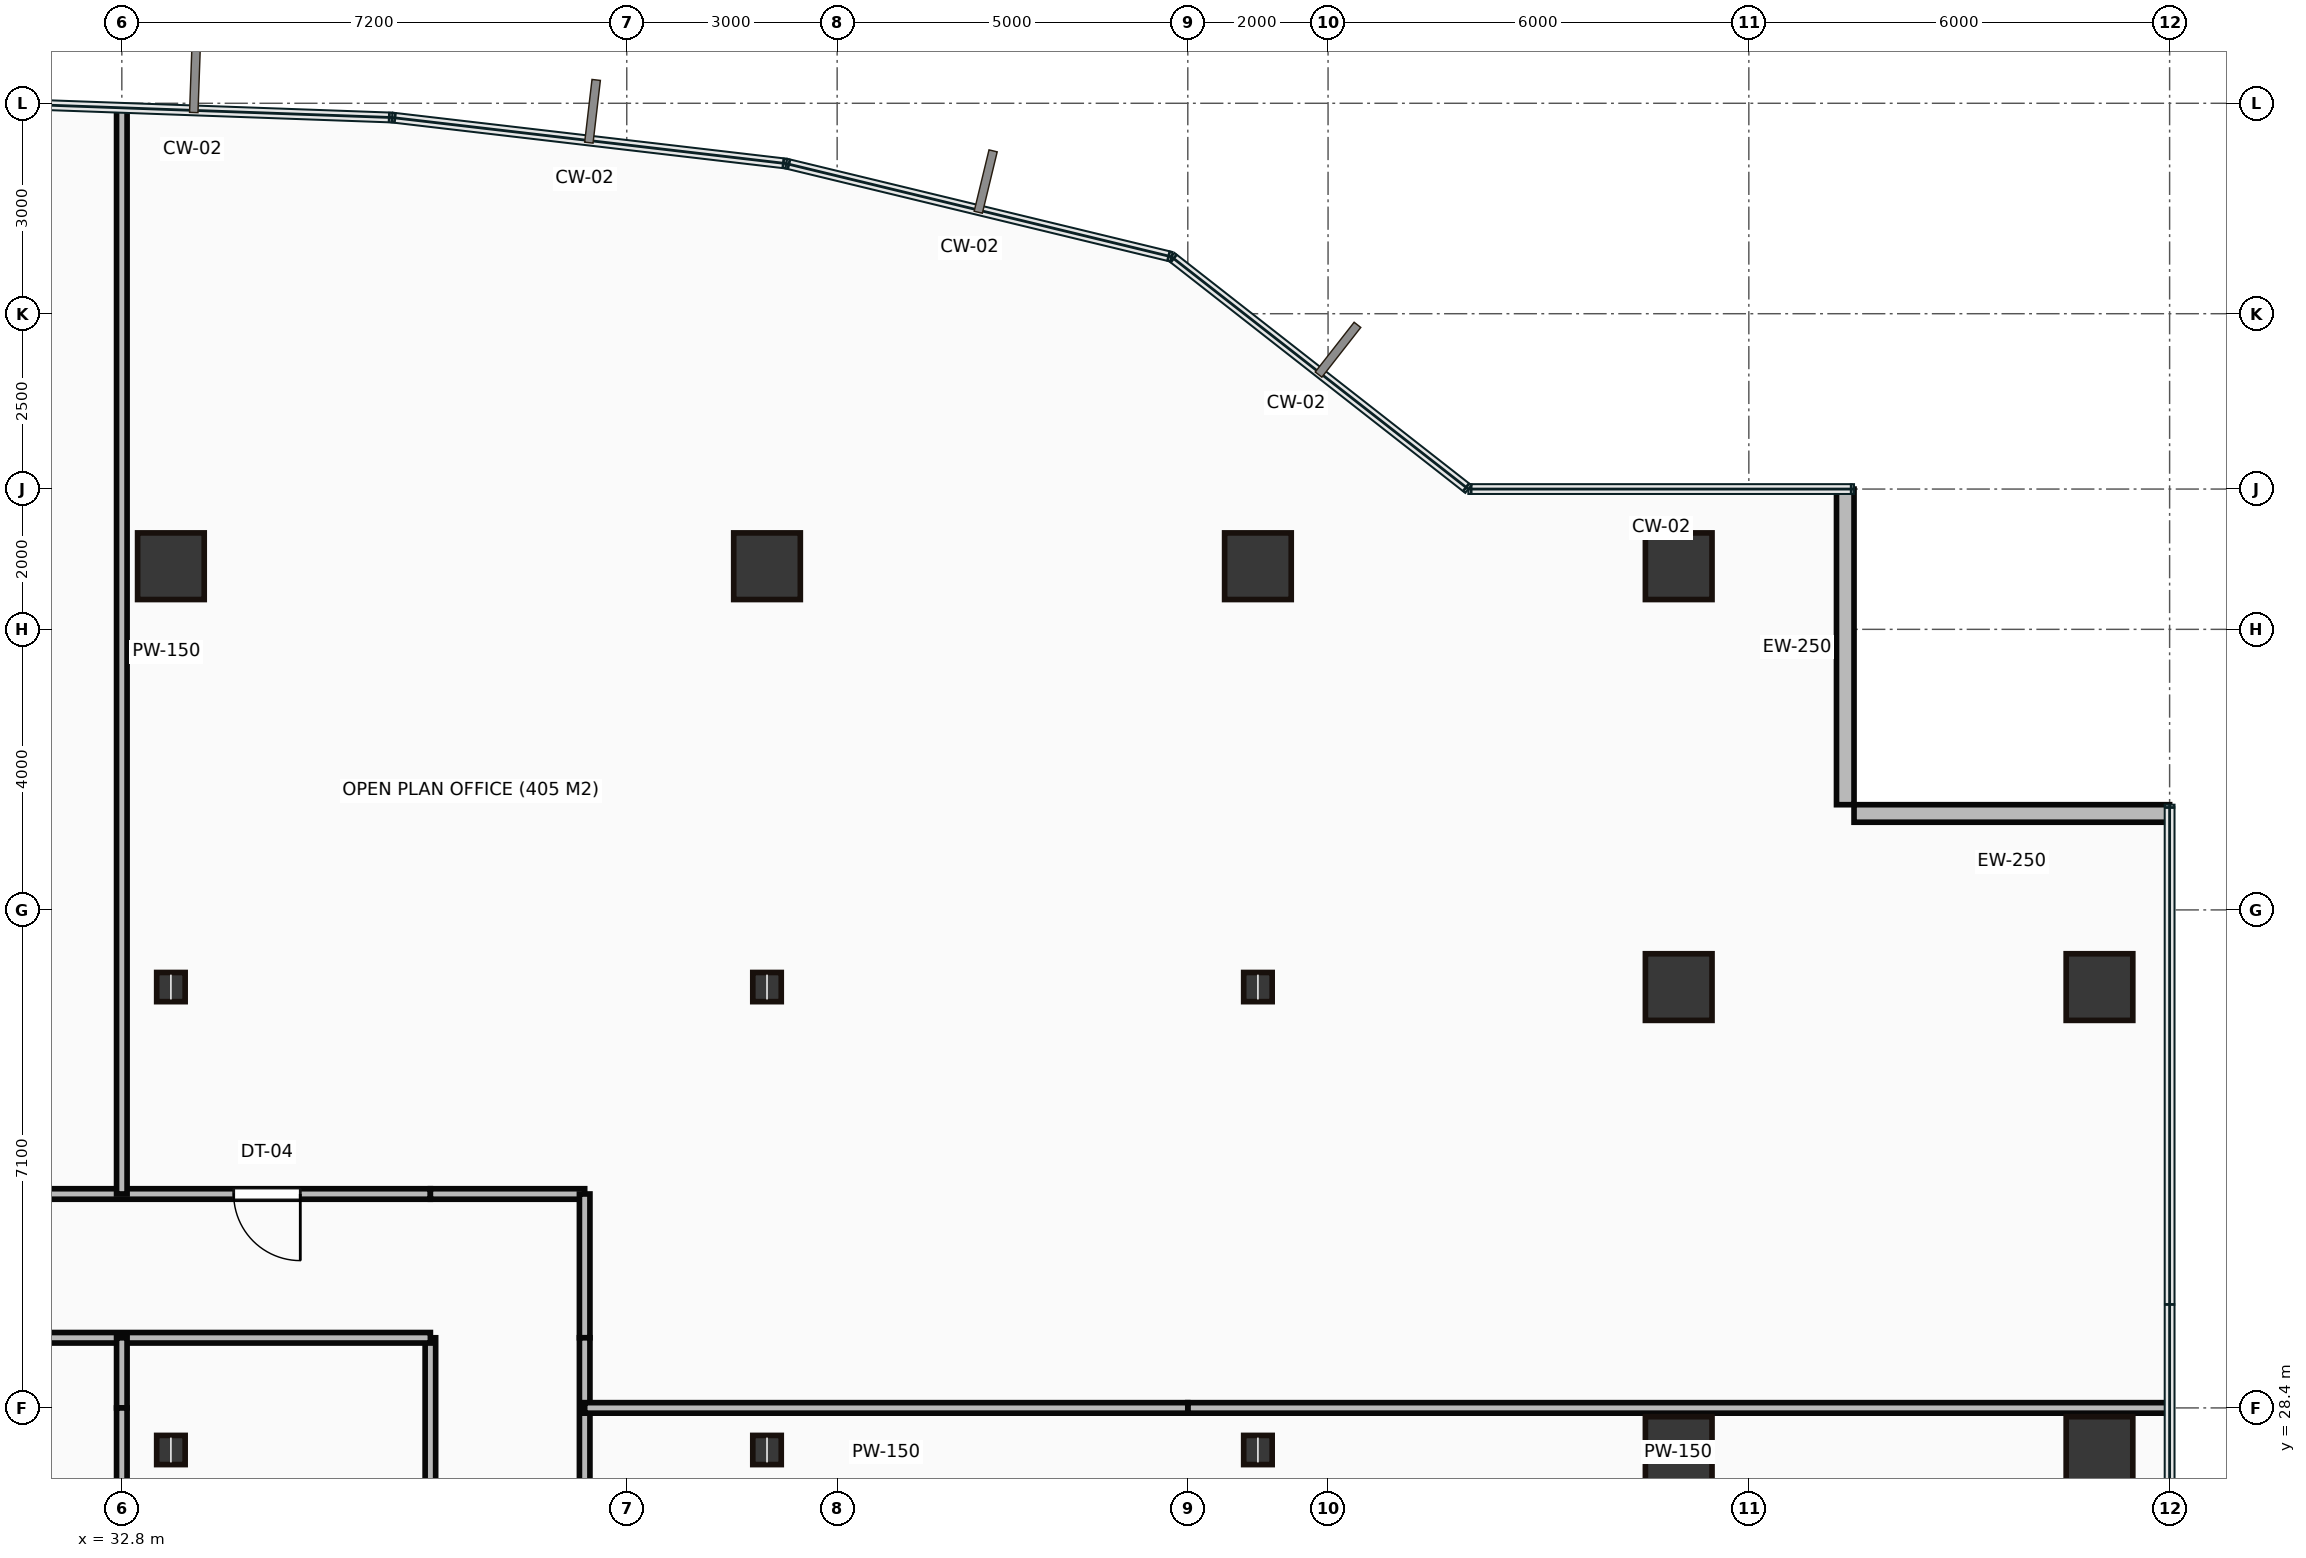
"""IFC4 building model, lengths in metres.
Left out: names, types, materials, properties, quantities, classifications, styles, units other than length and angle.
Written with IfcOpenShell. Run it as: python <this file> out.ifc"""

import sys

from ifc_helpers import new_model, si_unit, direction, frame, frame_2d, origin, origin_2d, place, context, subcontext, project, spatial, rectangle, hollow_rectangle, i_section, extrude, source, transform, mapped, element, fill, save


model = new_model("IFC4")
c1 = context("Model", 3, precision=1e-05, world=origin(), true_north=direction((0.0, 1.0)))
c2 = subcontext(c1, "Body", "Model", "MODEL_VIEW")
j1 = project(units=[si_unit("LENGTHUNIT", "METRE"), si_unit("PLANEANGLEUNIT", "RADIAN")], contexts=[c1])
p1 = place(None, origin())
s1 = spatial("IfcSite", under=j1, at=p1, CompositionType="ELEMENT")
p2 = place(p1, origin())
s2 = spatial("IfcBuilding", under=s1, at=p2, CompositionType="ELEMENT")
p3 = place(p2, frame((0.0, 0.0, 72.65)))
s3 = spatial("IfcBuildingStorey", under=s2, at=p3, CompositionType="ELEMENT", Elevation=72.65)
m1 = source(origin(), c2, "Body", "SweptSolid", [
    extrude(i_section(OverallWidth=0.406, OverallDepth=0.416, WebThickness=0.03, FlangeThickness=0.048, at=origin_2d()), origin(), (0.0, 0.0, 1.0), 3.65),
])
for number, where, z_axis, x_axis in (
    (1, (33.5, 27.8, 0.0), (0.0, 0.0, 1.0), (1.0, 0.0, 0.0)),
    (2, (33.5, 34.4, 0.0), (0.0, 0.0, 1.0), (1.0, 0.0, 0.0)),
):
    element("IfcColumn", number, at=place(p3, frame(where, z_axis=z_axis, x_axis=x_axis)), inside=s3, PredefinedType="COLUMN", context=c2, shape_type="MappedRepresentation", body=[
        mapped(m1, transform((0.0, 0.0, 0.0))),
    ])
m2 = source(origin(), c2, "Body", "SweptSolid", [
    extrude(hollow_rectangle(XDim=0.95, YDim=0.95, WallThickness=0.045, at=origin_2d()), origin(), (0.0, 0.0, 1.0), 3.65),
])
p4 = place(p3, frame((33.5, 40.4, 0.0), z_axis=(0.0, 0.0, 1.0), x_axis=(1.0, 0.0, 0.0)))
e3 = element("IfcColumn", 3, at=p4, inside=s3, PredefinedType="COLUMN", context=c2, shape_type="MappedRepresentation", body=[
    mapped(m2, transform((0.0, 0.0, 0.0))),
])
for number, where, z_axis, x_axis in (
    (4, (42.0, 27.8, 0.0), (0.0, 0.0, 1.0), (1.0, 0.0, 0.0)),
    (5, (42.0, 34.4, 0.0), (0.0, 0.0, 1.0), (1.0, 0.0, 0.0)),
):
    element("IfcColumn", number, at=place(p3, frame(where, z_axis=z_axis, x_axis=x_axis)), inside=s3, PredefinedType="COLUMN", context=c2, shape_type="MappedRepresentation", body=[
        mapped(m1, transform((0.0, 0.0, 0.0))),
    ])
p5 = place(p3, frame((42.0, 40.4, 0.0), z_axis=(0.0, 0.0, 1.0), x_axis=(1.0, 0.0, 0.0)))
e6 = element("IfcColumn", 6, at=p5, inside=s3, PredefinedType="COLUMN", context=c2, shape_type="MappedRepresentation", body=[
    mapped(m2, transform((0.0, 0.0, 0.0))),
])
for number, where, z_axis, x_axis in (
    (7, (49.0, 27.8, 0.0), (0.0, 0.0, 1.0), (1.0, 0.0, 0.0)),
    (8, (49.0, 34.4, 0.0), (0.0, 0.0, 1.0), (1.0, 0.0, 0.0)),
):
    element("IfcColumn", number, at=place(p3, frame(where, z_axis=z_axis, x_axis=x_axis)), inside=s3, PredefinedType="COLUMN", context=c2, shape_type="MappedRepresentation", body=[
        mapped(m1, transform((0.0, 0.0, 0.0))),
    ])
for number, where, z_axis, x_axis in (
    (9, (49.0, 40.4, 0.0), (0.0, 0.0, 1.0), (1.0, 0.0, 0.0)),
    (10, (55.0, 27.8, 0.0), (0.0, 0.0, 1.0), (1.0, 0.0, 0.0)),
    (11, (55.0, 34.4, 0.0), (0.0, 0.0, 1.0), (1.0, 0.0, 0.0)),
    (12, (55.0, 40.4, 0.0), (0.0, 0.0, 1.0), (1.0, 0.0, 0.0)),
    (13, (61.0, 27.8, 0.0), (0.0, 0.0, 1.0), (1.0, 0.0, 0.0)),
    (14, (61.0, 34.4, 0.0), (0.0, 0.0, 1.0), (1.0, 0.0, 0.0)),
):
    element("IfcColumn", number, at=place(p3, frame(where, z_axis=z_axis, x_axis=x_axis)), inside=s3, PredefinedType="COLUMN", context=c2, shape_type="MappedRepresentation", body=[
        mapped(m2, transform((0.0, 0.0, 0.0))),
    ])
m3 = source(origin(), c2, "Body", "SweptSolid", [
    extrude(rectangle(XDim=4.5, YDim=0.25, at=frame_2d((2.25, 0.0))), origin(), (0.0, 0.0, 1.0), 3.4),
])
for number, where, z_axis, x_axis in (
    (15, (62.0, 36.875, 0.0), (0.0, 0.0, 1.0), (-1.0, 0.0, 0.0)),
    (16, (57.375, 37.0, 0.0), (0.0, 0.0, 1.0), (0.0, 1.0, 0.0)),
):
    element("IfcWall", number, at=place(p3, frame(where, z_axis=z_axis, x_axis=x_axis)), inside=s3, PredefinedType="STANDARD", context=c2, shape_type="MappedRepresentation", body=[
        mapped(m3, transform((0.0, 0.0, 0.0))),
    ])
m4 = source(origin(), c2, "Body", "SweptSolid", [
    extrude(rectangle(XDim=25.2, YDim=0.15, at=frame_2d((12.6, 0.0))), origin(), (0.0, 0.0, 1.0), 3.4),
])
p6 = place(p3, frame((12.0, 31.45, 0.0), z_axis=(0.0, 0.0, 1.0), x_axis=(1.0, 0.0, 0.0)))
e17 = element("IfcWall", 17, at=p6, inside=s3, PredefinedType="PARTITIONING", context=c2, shape_type="MappedRepresentation", body=[
    mapped(m4, transform((0.0, 0.0, 0.0))),
])
p7 = place(p6, frame((4.655, 0.0, 0.0)))
e18 = element("IfcOpeningElement", 18, at=p7, cuts=e17, PredefinedType="OPENING", context=c2, shape_type="SweptSolid", body=[
    extrude(rectangle(XDim=0.95, YDim=2.15, at=frame_2d((0.475, 1.075))), frame((0.0, 0.085, 0.0), z_axis=(0.0, -1.0, 0.0), x_axis=(1.0, 0.0, 0.0)), (0.0, 0.0, 1.0), 0.17),
])
p8 = place(p6, frame((14.925, 0.0, 0.0)))
e19 = element("IfcOpeningElement", 19, at=p8, cuts=e17, PredefinedType="OPENING", context=c2, shape_type="SweptSolid", body=[
    extrude(rectangle(XDim=0.95, YDim=2.15, at=frame_2d((0.475, 1.075))), frame((0.0, 0.085, 0.0), z_axis=(0.0, -1.0, 0.0), x_axis=(1.0, 0.0, 0.0)), (0.0, 0.0, 1.0), 0.17),
])
p9 = place(p6, frame((22.395, 0.0, 0.0)))
e20 = element("IfcOpeningElement", 20, at=p9, cuts=e17, PredefinedType="OPENING", context=c2, shape_type="SweptSolid", body=[
    extrude(rectangle(XDim=0.95, YDim=2.15, at=frame_2d((0.475, 1.075))), frame((0.0, 0.085, 0.0), z_axis=(0.0, -1.0, 0.0), x_axis=(1.0, 0.0, 0.0)), (0.0, 0.0, 1.0), 0.17),
])
m5 = source(origin(), c2, "Body", "SweptSolid", [
    extrude(rectangle(XDim=2.2, YDim=0.15, at=frame_2d((1.1, 0.0))), origin(), (0.0, 0.0, 1.0), 3.4),
])
p10 = place(p3, frame((37.2, 31.45, 0.0), z_axis=(0.0, 0.0, 1.0), x_axis=(1.0, 0.0, 0.0)))
e21 = element("IfcWall", 21, at=p10, inside=s3, PredefinedType="PARTITIONING", context=c2, shape_type="MappedRepresentation", body=[
    mapped(m5, transform((0.0, 0.0, 0.0))),
])
m6 = source(origin(), c2, "Body", "SweptSolid", [
    extrude(rectangle(XDim=2.05, YDim=0.15, at=frame_2d((1.025, 0.0))), origin(), (0.0, 0.0, 1.0), 3.4),
])
p11 = place(p3, frame((39.4, 31.45, 0.0), z_axis=(0.0, 0.0, 1.0), x_axis=(0.0, -1.0, 0.0)))
e22 = element("IfcWall", 22, at=p11, inside=s3, PredefinedType="PARTITIONING", context=c2, shape_type="MappedRepresentation", body=[
    mapped(m6, transform((0.0, 0.0, 0.0))),
])
m7 = source(origin(), c2, "Body", "SweptSolid", [
    extrude(rectangle(XDim=13.15, YDim=0.15, at=frame_2d((6.575, 0.0))), origin(), (0.0, 0.0, 1.0), 3.4),
])
p12 = place(p3, frame((39.4, 29.4, 0.0), z_axis=(0.0, 0.0, 1.0), x_axis=(0.0, -1.0, 0.0)))
e23 = element("IfcWall", 23, at=p12, inside=s3, PredefinedType="PARTITIONING", context=c2, shape_type="MappedRepresentation", body=[
    mapped(m7, transform((0.0, 0.0, 0.0))),
])
p13 = place(p12, frame((6.47, 0.0, 0.0)))
e24 = element("IfcOpeningElement", 24, at=p13, cuts=e23, PredefinedType="OPENING", context=c2, shape_type="SweptSolid", body=[
    extrude(rectangle(XDim=0.95, YDim=2.15, at=frame_2d((0.475, 1.075))), frame((0.0, 0.085, 0.0), z_axis=(0.0, -1.0, 0.0), x_axis=(1.0, 0.0, 0.0)), (0.0, 0.0, 1.0), 0.17),
])
p14 = place(p3, frame((37.2, 16.25, 0.0), z_axis=(0.0, 0.0, 1.0), x_axis=(0.0, 1.0, 0.0)))
e25 = element("IfcWall", 25, at=p14, inside=s3, PredefinedType="PARTITIONING", context=c2, shape_type="MappedRepresentation", body=[
    mapped(m7, transform((0.0, 0.0, 0.0))),
])
p15 = place(p14, frame((6.1, 0.0, 0.0)))
e26 = element("IfcOpeningElement", 26, at=p15, cuts=e25, PredefinedType="OPENING", context=c2, shape_type="SweptSolid", body=[
    extrude(rectangle(XDim=0.95, YDim=2.15, at=frame_2d((0.475, 1.075))), frame((0.0, 0.085, 0.0), z_axis=(0.0, -1.0, 0.0), x_axis=(1.0, 0.0, 0.0)), (0.0, 0.0, 1.0), 0.17),
])
p16 = place(p3, frame((37.2, 29.4, 0.0), z_axis=(0.0, 0.0, 1.0), x_axis=(-1.0, 0.0, 0.0)))
e27 = element("IfcWall", 27, at=p16, inside=s3, PredefinedType="PARTITIONING", context=c2, shape_type="MappedRepresentation", body=[
    mapped(m4, transform((0.0, 0.0, 0.0))),
])
m8 = source(origin(), c2, "Body", "SweptSolid", [
    extrude(rectangle(XDim=1.0, YDim=0.15, at=frame_2d((0.5, 0.0))), origin(), (0.0, 0.0, 1.0), 3.4),
])
p17 = place(p3, frame((32.8, 29.4, 0.0), z_axis=(0.0, 0.0, 1.0), x_axis=(0.0, -1.0, 0.0)))
e28 = element("IfcWall", 28, at=p17, inside=s3, PredefinedType="PARTITIONING", context=c2, shape_type="MappedRepresentation", body=[
    mapped(m8, transform((0.0, 0.0, 0.0))),
])
m9 = source(origin(), c2, "Body", "SweptSolid", [
    extrude(rectangle(XDim=12.15, YDim=0.15, at=frame_2d((6.075, 0.0))), origin(), (0.0, 0.0, 1.0), 3.4),
])
p18 = place(p3, frame((32.8, 28.4, 0.0), z_axis=(0.0, 0.0, 1.0), x_axis=(0.0, -1.0, 0.0)))
e29 = element("IfcWall", 29, at=p18, inside=s3, PredefinedType="PARTITIONING", context=c2, shape_type="MappedRepresentation", body=[
    mapped(m9, transform((0.0, 0.0, 0.0))),
])
m10 = source(origin(), c2, "Body", "SweptSolid", [
    extrude(rectangle(XDim=15.465, YDim=0.15, at=frame_2d((7.733, 0.0))), origin(), (0.0, 0.0, 1.0), 3.4),
])
p19 = place(p3, frame((32.8, 46.915, 0.0), z_axis=(0.0, 0.0, 1.0), x_axis=(0.0, -1.0, 0.0)))
e30 = element("IfcWall", 30, at=p19, inside=s3, PredefinedType="PARTITIONING", context=c2, shape_type="MappedRepresentation", body=[
    mapped(m10, transform((0.0, 0.0, 0.0))),
])
m11 = source(origin(), c2, "Body", "SweptSolid", [
    extrude(rectangle(XDim=13.98, YDim=0.15, at=frame_2d((6.99, 0.0))), origin(), (0.0, 0.0, 1.0), 3.4),
])
p20 = place(p3, frame((61.98, 28.4, 0.0), z_axis=(0.0, 0.0, 1.0), x_axis=(-1.0, 0.0, 0.0)))
e31 = element("IfcWall", 31, at=p20, inside=s3, PredefinedType="PARTITIONING", context=c2, shape_type="MappedRepresentation", body=[
    mapped(m11, transform((0.0, 0.0, 0.0))),
])
m12 = source(origin(), c2, "Body", "SweptSolid", [
    extrude(rectangle(XDim=8.6, YDim=0.15, at=frame_2d((4.3, 0.0))), origin(), (0.0, 0.0, 1.0), 3.4),
])
p21 = place(p3, frame((48.0, 28.4, 0.0), z_axis=(0.0, 0.0, 1.0), x_axis=(-1.0, 0.0, 0.0)))
e32 = element("IfcWall", 32, at=p21, inside=s3, PredefinedType="PARTITIONING", context=c2, shape_type="MappedRepresentation", body=[
    mapped(m12, transform((0.0, 0.0, 0.0))),
])
m13 = source(origin(), c2, "Body", "SweptSolid", [
    extrude(rectangle(XDim=0.95, YDim=2.15, at=frame_2d((0.475, 1.075))), frame((0.0, 0.025, 0.0), z_axis=(0.0, -1.0, 0.0), x_axis=(1.0, 0.0, 0.0)), (0.0, 0.0, 1.0), 0.05),
])
p22 = place(p9, origin())
e33 = element("IfcDoor", 33, at=p22, inside=s3, OperationType="SINGLE_SWING_RIGHT", PredefinedType="DOOR", context=c2, shape_type="MappedRepresentation", body=[
    mapped(m13, transform((0.0, 0.0, 0.0))),
])
fill(e20, e33)
save(model, sys.argv[1])
